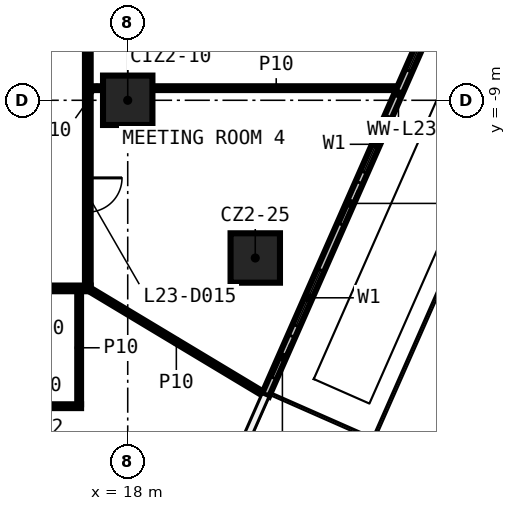
"""IFC4 building model, lengths in metres.
Left out: names, types, materials, properties, quantities, classifications, styles, units other than length and angle.
Written with IfcOpenShell. Run it as: python <this file> out.ifc"""

import sys

from ifc_helpers import new_model, si_unit, direction, frame, frame_2d, origin, origin_2d, place, context, subcontext, project, spatial, rectangle, extrude, element, fill, save


model = new_model("IFC4")
c1 = context("Model", 3, precision=1e-05, world=origin(), true_north=direction((0.0, 1.0)))
c2 = subcontext(c1, "Body", "Model", "MODEL_VIEW")
j1 = project(units=[si_unit("LENGTHUNIT", "METRE"), si_unit("PLANEANGLEUNIT", "RADIAN")], contexts=[c1])
p1 = place(None, origin())
s1 = spatial("IfcSite", under=j1, at=p1, CompositionType="ELEMENT")
p2 = place(p1, origin())
s2 = spatial("IfcBuilding", under=s1, at=p2, CompositionType="ELEMENT")
p3 = place(p2, frame((0.0, 0.0, 110.0)))
s3 = spatial("IfcBuildingStorey", under=s2, at=p3, CompositionType="ELEMENT", Elevation=110.0)
for number, where, z_axis, x_axis in (
    (1, (21.356, -13.15, 0.0), (0.0, 0.0, 1.0), (1.0, 0.0, 0.0)),
    (2, (18.0, -9.0, 0.0), (0.0, 0.0, 1.0), (1.0, 0.0, 0.0)),
):
    element("IfcColumn", number, at=place(p3, frame(where, z_axis=z_axis, x_axis=x_axis)), inside=s3, PredefinedType="COLUMN", context=c2, shape_type="SweptSolid", body=[
        extrude(rectangle(XDim=1.3, YDim=1.3, at=origin_2d()), origin(), (0.0, 0.0, 1.0), 3.3),
    ])
p4 = place(p3, frame((14.272, -17.05, 0.0), z_axis=(0.0, 0.0, 1.0), x_axis=(1.0, 0.0, 0.0)))
e3 = element("IfcWall", 3, at=p4, inside=s3, PredefinedType="PARTITIONING", context=c2, shape_type="SweptSolid", body=[
    extrude(rectangle(XDim=2.5, YDim=0.1, at=frame_2d((1.25, 0.0))), origin(), (0.0, 0.0, 1.0), 3.3),
])
p5 = place(p3, frame((17.025, -13.95, 0.0), z_axis=(0.0, 0.0, 1.0), x_axis=(-1.0, 0.0, 0.0)))
e4 = element("IfcWall", 4, at=p5, inside=s3, PredefinedType="PARTITIONING", context=c2, shape_type="SweptSolid", body=[
    extrude(rectangle(XDim=34.05, YDim=0.15, at=frame_2d((17.025, 0.0))), origin(), (0.0, 0.0, 1.0), 3.3),
])
p6 = place(p5, frame((31.974, 0.0, 0.0)))
e5 = element("IfcOpeningElement", 5, at=p6, cuts=e4, PredefinedType="OPENING", context=c2, shape_type="SweptSolid", body=[
    extrude(rectangle(XDim=0.9, YDim=2.1, at=frame_2d((0.45, 1.05))), frame((0.0, 0.085, 0.0), z_axis=(0.0, -1.0, 0.0), x_axis=(1.0, 0.0, 0.0)), (0.0, 0.0, 1.0), 0.17),
])
p7 = place(p5, frame((27.543, 0.0, 0.0)))
e6 = element("IfcOpeningElement", 6, at=p7, cuts=e4, PredefinedType="OPENING", context=c2, shape_type="SweptSolid", body=[
    extrude(rectangle(XDim=1.0, YDim=2.1, at=frame_2d((0.5, 1.05))), frame((0.0, 0.085, 0.0), z_axis=(0.0, -1.0, 0.0), x_axis=(1.0, 0.0, 0.0)), (0.0, 0.0, 1.0), 0.17),
])
p8 = place(p5, frame((16.333, 0.0, 0.0)))
e7 = element("IfcOpeningElement", 7, at=p8, cuts=e4, PredefinedType="OPENING", context=c2, shape_type="SweptSolid", body=[
    extrude(rectangle(XDim=1.0, YDim=2.1, at=frame_2d((0.5, 1.05))), frame((0.0, 0.085, 0.0), z_axis=(0.0, -1.0, 0.0), x_axis=(1.0, 0.0, 0.0)), (0.0, 0.0, 1.0), 0.17),
])
p9 = place(p5, frame((12.006, 0.0, 0.0)))
e8 = element("IfcOpeningElement", 8, at=p9, cuts=e4, PredefinedType="OPENING", context=c2, shape_type="SweptSolid", body=[
    extrude(rectangle(XDim=1.0, YDim=2.1, at=frame_2d((0.5, 1.05))), frame((0.0, 0.085, 0.0), z_axis=(0.0, -1.0, 0.0), x_axis=(1.0, 0.0, 0.0)), (0.0, 0.0, 1.0), 0.17),
])
p10 = place(p5, frame((5.124, 0.0, 0.0)))
e9 = element("IfcOpeningElement", 9, at=p10, cuts=e4, PredefinedType="OPENING", context=c2, shape_type="SweptSolid", body=[
    extrude(rectangle(XDim=1.0, YDim=2.1, at=frame_2d((0.5, 1.05))), frame((0.0, 0.085, 0.0), z_axis=(0.0, -1.0, 0.0), x_axis=(1.0, 0.0, 0.0)), (0.0, 0.0, 1.0), 0.17),
])
p11 = place(p5, frame((3.144, 0.0, 0.0)))
e10 = element("IfcOpeningElement", 10, at=p11, cuts=e4, PredefinedType="OPENING", context=c2, shape_type="SweptSolid", body=[
    extrude(rectangle(XDim=1.0, YDim=2.1, at=frame_2d((0.5, 1.05))), frame((0.0, 0.085, 0.0), z_axis=(0.0, -1.0, 0.0), x_axis=(1.0, 0.0, 0.0)), (0.0, 0.0, 1.0), 0.17),
])
p12 = place(p3, frame((17.025, -8.681, 0.0), z_axis=(0.0, 0.0, 1.0), x_axis=(1.0, 0.0, 0.0)))
e11 = element("IfcWall", 11, at=p12, inside=s3, PredefinedType="PARTITIONING", context=c2, shape_type="SweptSolid", body=[
    extrude(rectangle(XDim=0.325, YDim=0.1, at=frame_2d((0.163, 0.0))), origin(), (0.0, 0.0, 1.0), 3.3),
])
p13 = place(p3, frame((18.65, -8.681, 0.0), z_axis=(0.0, 0.0, 1.0), x_axis=(1.0, 0.0, 0.0)))
e12 = element("IfcWall", 12, at=p13, inside=s3, PredefinedType="PARTITIONING", context=c2, shape_type="SweptSolid", body=[
    extrude(rectangle(XDim=6.515, YDim=0.1, at=frame_2d((3.258, 0.0))), origin(), (0.0, 0.0, 1.0), 3.3),
])
p14 = place(p3, frame((16.95, 13.875, 0.0), z_axis=(0.0, 0.0, 1.0), x_axis=(0.0, -1.0, 0.0)))
e13 = element("IfcWall", 13, at=p14, inside=s3, PredefinedType="PARTITIONING", context=c2, shape_type="SweptSolid", body=[
    extrude(rectangle(XDim=27.75, YDim=0.15, at=frame_2d((13.875, 0.0))), origin(), (0.0, 0.0, 1.0), 3.3),
])
p15 = place(p14, frame((24.917, 0.0, 0.0)))
e14 = element("IfcOpeningElement", 14, at=p15, cuts=e13, PredefinedType="OPENING", context=c2, shape_type="SweptSolid", body=[
    extrude(rectangle(XDim=0.9, YDim=2.1, at=frame_2d((0.45, 1.05))), frame((0.0, 0.085, 0.0), z_axis=(0.0, -1.0, 0.0), x_axis=(1.0, 0.0, 0.0)), (0.0, 0.0, 1.0), 0.17),
])
p16 = place(p14, frame((20.086, 0.0, 0.0)))
e15 = element("IfcOpeningElement", 15, at=p16, cuts=e13, PredefinedType="OPENING", context=c2, shape_type="SweptSolid", body=[
    extrude(rectangle(XDim=0.9, YDim=2.1, at=frame_2d((0.45, 1.05))), frame((0.0, 0.085, 0.0), z_axis=(0.0, -1.0, 0.0), x_axis=(1.0, 0.0, 0.0)), (0.0, 0.0, 1.0), 0.17),
])
p17 = place(p14, frame((16.047, 0.0, 0.0)))
e16 = element("IfcOpeningElement", 16, at=p17, cuts=e13, PredefinedType="OPENING", context=c2, shape_type="SweptSolid", body=[
    extrude(rectangle(XDim=0.9, YDim=2.1, at=frame_2d((0.45, 1.05))), frame((0.0, 0.085, 0.0), z_axis=(0.0, -1.0, 0.0), x_axis=(1.0, 0.0, 0.0)), (0.0, 0.0, 1.0), 0.17),
])
p18 = place(p14, frame((11.091, 0.0, 0.0)))
e17 = element("IfcOpeningElement", 17, at=p18, cuts=e13, PredefinedType="OPENING", context=c2, shape_type="SweptSolid", body=[
    extrude(rectangle(XDim=0.9, YDim=2.1, at=frame_2d((0.45, 1.05))), frame((0.0, 0.085, 0.0), z_axis=(0.0, -1.0, 0.0), x_axis=(1.0, 0.0, 0.0)), (0.0, 0.0, 1.0), 0.17),
])
p19 = place(p14, frame((7.093, 0.0, 0.0)))
e18 = element("IfcOpeningElement", 18, at=p19, cuts=e13, PredefinedType="OPENING", context=c2, shape_type="SweptSolid", body=[
    extrude(rectangle(XDim=0.9, YDim=2.1, at=frame_2d((0.45, 1.05))), frame((0.0, 0.085, 0.0), z_axis=(0.0, -1.0, 0.0), x_axis=(1.0, 0.0, 0.0)), (0.0, 0.0, 1.0), 0.17),
])
p20 = place(p14, frame((2.057, 0.0, 0.0)))
e19 = element("IfcOpeningElement", 19, at=p20, cuts=e13, PredefinedType="OPENING", context=c2, shape_type="SweptSolid", body=[
    extrude(rectangle(XDim=0.9, YDim=2.1, at=frame_2d((0.45, 1.05))), frame((0.0, 0.085, 0.0), z_axis=(0.0, -1.0, 0.0), x_axis=(1.0, 0.0, 0.0)), (0.0, 0.0, 1.0), 0.17),
])
p21 = place(p3, frame((16.722, -17.0, 0.0), z_axis=(0.0, 0.0, 1.0), x_axis=(0.0, 1.0, 0.0)))
e20 = element("IfcWall", 20, at=p21, inside=s3, PredefinedType="PARTITIONING", context=c2, shape_type="SweptSolid", body=[
    extrude(rectangle(XDim=2.975, YDim=0.1, at=frame_2d((1.488, 0.0))), origin(), (0.0, 0.0, 1.0), 3.3),
])
p22 = place(p3, frame((16.95, -13.95, 0.0), z_axis=(0.0, 0.0, 1.0), x_axis=(0.857183640751, -0.515010879525, 0.0)))
e21 = element("IfcWall", 21, at=p22, inside=s3, PredefinedType="PARTITIONING", context=c2, shape_type="SweptSolid", body=[
    extrude(rectangle(XDim=5.436, YDim=0.1, at=frame_2d((2.718, 0.0))), origin(), (0.0, 0.0, 1.0), 3.3),
])
p23 = place(p3, frame((21.626, -16.76, 0.0), z_axis=(0.0, 0.0, 1.0), x_axis=(0.403293642116, 0.915070619258, 0.0)))
e22 = element("IfcWall", 22, at=p23, inside=s3, PredefinedType="SOLIDWALL", context=c2, shape_type="SweptSolid", body=[
    extrude(rectangle(XDim=17.657, YDim=0.2, at=frame_2d((8.829, 0.0))), origin(), (0.0, 0.0, 1.0), 3.3),
])
p24 = place(p23, frame((2.0, 0.0, 0.6)))
e23 = element("IfcOpeningElement", 23, at=p24, cuts=e22, PredefinedType="OPENING", context=c2, shape_type="SweptSolid", body=[
    extrude(rectangle(XDim=1.6, YDim=2.4, at=frame_2d((0.8, 1.2))), frame((0.0, 0.11, 0.0), z_axis=(0.0, -1.0, 0.0), x_axis=(1.0, 0.0, 0.0)), (0.0, 0.0, 1.0), 0.22),
])
p25 = place(p23, frame((0.5, 0.0, 0.0)))
e24 = element("IfcOpeningElement", 24, at=p25, cuts=e22, PredefinedType="OPENING", context=c2, shape_type="SweptSolid", body=[
    extrude(rectangle(XDim=1.2, YDim=2.4, at=frame_2d((0.6, 1.2))), frame((0.0, 0.11, 0.0), z_axis=(0.0, -1.0, 0.0), x_axis=(1.0, 0.0, 0.0)), (0.0, 0.0, 1.0), 0.22),
])
p26 = place(p23, frame((6.414, 0.0, 0.6)))
e25 = element("IfcOpeningElement", 25, at=p26, cuts=e22, PredefinedType="OPENING", context=c2, shape_type="SweptSolid", body=[
    extrude(rectangle(XDim=1.6, YDim=2.4, at=frame_2d((0.8, 1.2))), frame((0.0, 0.11, 0.0), z_axis=(0.0, -1.0, 0.0), x_axis=(1.0, 0.0, 0.0)), (0.0, 0.0, 1.0), 0.22),
])
p27 = place(p23, frame((4.914, 0.0, 0.0)))
e26 = element("IfcOpeningElement", 26, at=p27, cuts=e22, PredefinedType="OPENING", context=c2, shape_type="SweptSolid", body=[
    extrude(rectangle(XDim=1.2, YDim=2.4, at=frame_2d((0.6, 1.2))), frame((0.0, 0.11, 0.0), z_axis=(0.0, -1.0, 0.0), x_axis=(1.0, 0.0, 0.0)), (0.0, 0.0, 1.0), 0.22),
])
p28 = place(p23, frame((9.329, 0.0, 0.6)))
e27 = element("IfcOpeningElement", 27, at=p28, cuts=e22, PredefinedType="OPENING", context=c2, shape_type="SweptSolid", body=[
    extrude(rectangle(XDim=1.6, YDim=2.4, at=frame_2d((0.8, 1.2))), frame((0.0, 0.11, 0.0), z_axis=(0.0, -1.0, 0.0), x_axis=(1.0, 0.0, 0.0)), (0.0, 0.0, 1.0), 0.22),
])
p29 = place(p23, frame((11.329, 0.0, 0.0)))
e28 = element("IfcOpeningElement", 28, at=p29, cuts=e22, PredefinedType="OPENING", context=c2, shape_type="SweptSolid", body=[
    extrude(rectangle(XDim=1.2, YDim=2.4, at=frame_2d((0.6, 1.2))), frame((0.0, 0.11, 0.0), z_axis=(0.0, -1.0, 0.0), x_axis=(1.0, 0.0, 0.0)), (0.0, 0.0, 1.0), 0.22),
])
p30 = place(p23, frame((15.243, 0.0, 0.6)))
e29 = element("IfcOpeningElement", 29, at=p30, cuts=e22, PredefinedType="OPENING", context=c2, shape_type="SweptSolid", body=[
    extrude(rectangle(XDim=1.6, YDim=2.4, at=frame_2d((0.8, 1.2))), frame((0.0, 0.11, 0.0), z_axis=(0.0, -1.0, 0.0), x_axis=(1.0, 0.0, 0.0)), (0.0, 0.0, 1.0), 0.22),
])
p31 = place(p23, frame((13.743, 0.0, 0.0)))
e30 = element("IfcOpeningElement", 30, at=p31, cuts=e22, PredefinedType="OPENING", context=c2, shape_type="SweptSolid", body=[
    extrude(rectangle(XDim=1.2, YDim=2.4, at=frame_2d((0.6, 1.2))), frame((0.0, 0.11, 0.0), z_axis=(0.0, -1.0, 0.0), x_axis=(1.0, 0.0, 0.0)), (0.0, 0.0, 1.0), 0.22),
])
p32 = place(p15, origin())
e31 = element("IfcDoor", 31, at=p32, inside=s3, OperationType="SINGLE_SWING_RIGHT", PredefinedType="DOOR", context=c2, shape_type="SweptSolid", body=[
    extrude(rectangle(XDim=0.9, YDim=2.1, at=frame_2d((0.45, 1.05))), frame((0.0, 0.025, 0.0), z_axis=(0.0, -1.0, 0.0), x_axis=(1.0, 0.0, 0.0)), (0.0, 0.0, 1.0), 0.05),
])
fill(e14, e31)
p33 = place(p24, origin())
e32 = element("IfcWindow", 32, at=p33, inside=s3, PartitioningType="SINGLE_PANEL", PredefinedType="WINDOW", context=c2, shape_type="SweptSolid", body=[
    extrude(rectangle(XDim=1.6, YDim=2.4, at=frame_2d((0.8, 1.2))), frame((0.0, 0.03, 0.0), z_axis=(0.0, -1.0, 0.0), x_axis=(1.0, 0.0, 0.0)), (0.0, 0.0, 1.0), 0.06),
])
fill(e23, e32)
p34 = place(p25, origin())
e33 = element("IfcDoor", 33, at=p34, inside=s3, OperationType="SLIDING_TO_LEFT", PredefinedType="DOOR", context=c2, shape_type="SweptSolid", body=[
    extrude(rectangle(XDim=1.2, YDim=2.4, at=frame_2d((0.6, 1.2))), frame((0.0, 0.025, 0.0), z_axis=(0.0, -1.0, 0.0), x_axis=(1.0, 0.0, 0.0)), (0.0, 0.0, 1.0), 0.05),
])
fill(e24, e33)
p35 = place(p26, origin())
e34 = element("IfcWindow", 34, at=p35, inside=s3, PartitioningType="SINGLE_PANEL", PredefinedType="WINDOW", context=c2, shape_type="SweptSolid", body=[
    extrude(rectangle(XDim=1.6, YDim=2.4, at=frame_2d((0.8, 1.2))), frame((0.0, 0.03, 0.0), z_axis=(0.0, -1.0, 0.0), x_axis=(1.0, 0.0, 0.0)), (0.0, 0.0, 1.0), 0.06),
])
fill(e25, e34)
p36 = place(p27, origin())
e35 = element("IfcDoor", 35, at=p36, inside=s3, OperationType="SLIDING_TO_LEFT", PredefinedType="DOOR", context=c2, shape_type="SweptSolid", body=[
    extrude(rectangle(XDim=1.2, YDim=2.4, at=frame_2d((0.6, 1.2))), frame((0.0, 0.025, 0.0), z_axis=(0.0, -1.0, 0.0), x_axis=(1.0, 0.0, 0.0)), (0.0, 0.0, 1.0), 0.05),
])
fill(e26, e35)
p37 = place(p28, origin())
e36 = element("IfcWindow", 36, at=p37, inside=s3, PartitioningType="SINGLE_PANEL", PredefinedType="WINDOW", context=c2, shape_type="SweptSolid", body=[
    extrude(rectangle(XDim=1.6, YDim=2.4, at=frame_2d((0.8, 1.2))), frame((0.0, 0.03, 0.0), z_axis=(0.0, -1.0, 0.0), x_axis=(1.0, 0.0, 0.0)), (0.0, 0.0, 1.0), 0.06),
])
fill(e27, e36)
save(model, sys.argv[1])
